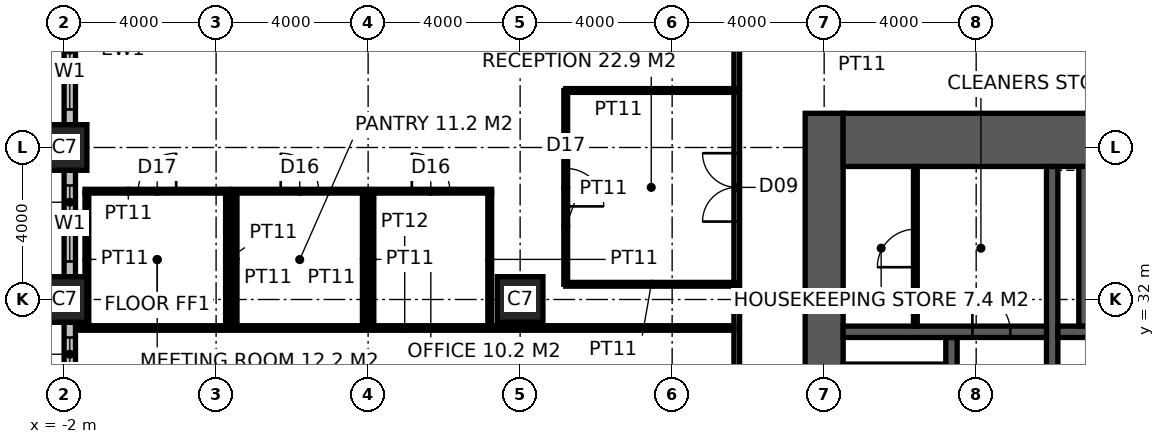
"""IFC4 building model, lengths in metres.
Left out: names, types, materials, properties, quantities, classifications, styles, units other than length and angle.
Written with IfcOpenShell. Run it as: python <this file> out.ifc"""

import sys

from ifc_helpers import new_model, si_unit, direction, frame, frame_2d, origin, origin_2d, place, context, subcontext, project, spatial, rectangle, hollow_rectangle, extrude, element, fill, save


model = new_model("IFC4")
c1 = context("Model", 3, precision=1e-05, world=origin(), true_north=direction((0.0, 1.0)))
c2 = subcontext(c1, "Body", "Model", "MODEL_VIEW")
j1 = project(units=[si_unit("LENGTHUNIT", "METRE"), si_unit("PLANEANGLEUNIT", "RADIAN")], contexts=[c1])
p1 = place(None, origin())
s1 = spatial("IfcSite", under=j1, at=p1, CompositionType="ELEMENT")
p2 = place(p1, origin())
s2 = spatial("IfcBuilding", under=s1, at=p2, CompositionType="ELEMENT")
p3 = place(p2, frame((0.0, 0.0, 63.0)))
s3 = spatial("IfcBuildingStorey", under=s2, at=p3, CompositionType="ELEMENT", Elevation=63.0)
for number, where, z_axis, x_axis in (
    (1, (-2.0, 32.0, 0.0), (0.0, 0.0, 1.0), (1.0, 0.0, 0.0)),
    (2, (-2.0, 36.0, 0.0), (0.0, 0.0, 1.0), (1.0, 0.0, 0.0)),
    (3, (10.0, 32.0, 0.0), (0.0, 0.0, 1.0), (1.0, 0.0, 0.0)),
):
    element("IfcColumn", number, at=place(p3, frame(where, z_axis=z_axis, x_axis=x_axis)), inside=s3, PredefinedType="COLUMN", context=c2, shape_type="SweptSolid", body=[
        extrude(hollow_rectangle(XDim=1.2, YDim=1.2, WallThickness=0.1, at=origin_2d()), origin(), (0.0, 0.0, 1.0), 4.0),
    ])
p4 = place(p3, frame((18.0, 17.1, -0.15), z_axis=(0.0, 0.0, 1.0), x_axis=(0.0, 1.0, 0.0)))
e4 = element("IfcWall", 4, at=p4, inside=s3, PredefinedType="SHEAR", context=c2, shape_type="SweptSolid", body=[
    extrude(rectangle(XDim=19.8, YDim=1.0, at=frame_2d((9.9, 0.0))), origin(), (0.0, 0.0, 1.0), 4.0),
])
p5 = place(p3, frame((18.5, 36.2, -0.15), z_axis=(0.0, 0.0, 1.0), x_axis=(1.0, 0.0, 0.0)))
e5 = element("IfcWall", 5, at=p5, inside=s3, PredefinedType="SHEAR", context=c2, shape_type="SweptSolid", body=[
    extrude(rectangle(XDim=23.7, YDim=1.4, at=frame_2d((11.85, 0.0))), origin(), (0.0, 0.0, 1.0), 4.0),
])
p6 = place(p3, frame((24.0, 18.5, -0.15), z_axis=(0.0, 0.0, 1.0), x_axis=(0.0, 1.0, 0.0)))
e6 = element("IfcWall", 6, at=p6, inside=s3, PredefinedType="SHEAR", context=c2, shape_type="SweptSolid", body=[
    extrude(rectangle(XDim=17.0, YDim=0.3, at=frame_2d((8.5, 0.0))), origin(), (0.0, 0.0, 1.0), 4.0),
])
p7 = place(p6, frame((9.6, 0.0, 0.15)))
e7 = element("IfcOpeningElement", 7, at=p7, cuts=e6, PredefinedType="OPENING", context=c2, shape_type="SweptSolid", body=[
    extrude(rectangle(XDim=1.5, YDim=2.4, at=frame_2d((0.75, 1.2))), frame((0.0, 0.16, 0.0), z_axis=(0.0, -1.0, 0.0), x_axis=(1.0, 0.0, 0.0)), (0.0, 0.0, 1.0), 0.32),
])
p8 = place(p3, frame((24.15, 31.15, -0.15), z_axis=(0.0, 0.0, 1.0), x_axis=(1.0, 0.0, 0.0)))
e8 = element("IfcWall", 8, at=p8, inside=s3, PredefinedType="SHEAR", context=c2, shape_type="SweptSolid", body=[
    extrude(rectangle(XDim=11.25, YDim=0.3, at=frame_2d((5.625, 0.0))), origin(), (0.0, 0.0, 1.0), 4.0),
])
p9 = place(p8, frame((7.25, 0.0, 0.15)))
e9 = element("IfcOpeningElement", 9, at=p9, cuts=e8, PredefinedType="OPENING", context=c2, shape_type="SweptSolid", body=[
    extrude(rectangle(XDim=1.4, YDim=2.4, at=frame_2d((0.7, 1.2))), frame((0.0, 0.16, 0.0), z_axis=(0.0, -1.0, 0.0), x_axis=(1.0, 0.0, 0.0)), (0.0, 0.0, 1.0), 0.32),
])
p10 = place(p3, frame((21.35, 18.5, -0.15), z_axis=(0.0, 0.0, 1.0), x_axis=(0.0, 1.0, 0.0)))
e10 = element("IfcWall", 10, at=p10, inside=s3, PredefinedType="SHEAR", context=c2, shape_type="SweptSolid", body=[
    extrude(rectangle(XDim=12.5, YDim=0.3, at=frame_2d((6.25, 0.0))), origin(), (0.0, 0.0, 1.0), 4.0),
])
p11 = place(p10, frame((8.15, 0.0, 0.15)))
e11 = element("IfcOpeningElement", 11, at=p11, cuts=e10, PredefinedType="OPENING", context=c2, shape_type="SweptSolid", body=[
    extrude(rectangle(XDim=1.0, YDim=2.2, at=frame_2d((0.5, 1.1))), frame((0.0, 0.16, 0.0), z_axis=(0.0, -1.0, 0.0), x_axis=(1.0, 0.0, 0.0)), (0.0, 0.0, 1.0), 0.32),
])
p12 = place(p3, frame((18.5, 31.15, -0.15), z_axis=(0.0, 0.0, 1.0), x_axis=(1.0, 0.0, 0.0)))
e12 = element("IfcWall", 12, at=p12, inside=s3, PredefinedType="SHEAR", context=c2, shape_type="SweptSolid", body=[
    extrude(rectangle(XDim=5.35, YDim=0.3, at=frame_2d((2.675, 0.0))), origin(), (0.0, 0.0, 1.0), 4.0),
])
p13 = place(p12, frame((3.4, 0.0, 0.15)))
e13 = element("IfcOpeningElement", 13, at=p13, cuts=e12, PredefinedType="OPENING", context=c2, shape_type="SweptSolid", body=[
    extrude(rectangle(XDim=1.0, YDim=2.2, at=frame_2d((0.5, 1.1))), frame((0.0, 0.16, 0.0), z_axis=(0.0, -1.0, 0.0), x_axis=(1.0, 0.0, 0.0)), (0.0, 0.0, 1.0), 0.32),
])
p14 = place(p3, frame((24.85, 31.3, -0.15), z_axis=(0.0, 0.0, 1.0), x_axis=(0.0, 1.0, 0.0)))
e14 = element("IfcWall", 14, at=p14, inside=s3, PredefinedType="SHEAR", context=c2, shape_type="SweptSolid", body=[
    extrude(rectangle(XDim=4.2, YDim=0.3, at=frame_2d((2.1, 0.0))), origin(), (0.0, 0.0, 1.0), 4.0),
])
p15 = place(p3, frame((20.4, 31.3, 0.0), z_axis=(0.0, 0.0, 1.0), x_axis=(0.0, 1.0, 0.0)))
e15 = element("IfcWall", 15, at=p15, inside=s3, PredefinedType="PARTITIONING", context=c2, shape_type="SweptSolid", body=[
    extrude(rectangle(XDim=4.2, YDim=0.1, at=frame_2d((2.1, 0.0))), origin(), (0.0, 0.0, 1.0), 3.85),
])
p16 = place(p15, frame((1.55, 0.0, 0.0)))
e16 = element("IfcOpeningElement", 16, at=p16, cuts=e15, PredefinedType="OPENING", context=c2, shape_type="SweptSolid", body=[
    extrude(rectangle(XDim=1.0, YDim=2.2, at=frame_2d((0.5, 1.1))), frame((0.0, 0.06, 0.0), z_axis=(0.0, -1.0, 0.0), x_axis=(1.0, 0.0, 0.0)), (0.0, 0.0, 1.0), 0.12),
])
p17 = place(p3, frame((15.7, 14.625, 0.0), z_axis=(0.0, 0.0, 1.0), x_axis=(0.0, 1.0, 0.0)))
e17 = element("IfcWall", 17, at=p17, inside=s3, PredefinedType="PARTITIONING", context=c2, shape_type="SweptSolid", body=[
    extrude(rectangle(XDim=24.15, YDim=0.15, at=frame_2d((12.075, 0.0))), origin(), (0.0, 0.0, 1.0), 3.85),
])
p18 = place(p17, frame((7.475, 0.0, 0.0)))
e18 = element("IfcOpeningElement", 18, at=p18, cuts=e17, PredefinedType="OPENING", context=c2, shape_type="SweptSolid", body=[
    extrude(rectangle(XDim=1.8, YDim=2.4, at=frame_2d((0.9, 1.2))), frame((0.0, 0.085, 0.0), z_axis=(0.0, -1.0, 0.0), x_axis=(1.0, 0.0, 0.0)), (0.0, 0.0, 1.0), 0.17),
])
p19 = place(p17, frame((19.425, 0.0, 0.0)))
e19 = element("IfcOpeningElement", 19, at=p19, cuts=e17, PredefinedType="OPENING", context=c2, shape_type="SweptSolid", body=[
    extrude(rectangle(XDim=1.8, YDim=2.4, at=frame_2d((0.9, 1.2))), frame((0.0, 0.085, 0.0), z_axis=(0.0, -1.0, 0.0), x_axis=(1.0, 0.0, 0.0)), (0.0, 0.0, 1.0), 0.17),
])
p20 = place(p3, frame((-1.7, 31.25, 0.0), z_axis=(0.0, 0.0, 1.0), x_axis=(1.0, 0.0, 0.0)))
e20 = element("IfcWall", 20, at=p20, inside=s3, PredefinedType="PARTITIONING", context=c2, shape_type="SweptSolid", body=[
    extrude(rectangle(XDim=17.325, YDim=0.12, at=frame_2d((8.663, 0.0))), origin(), (0.0, 0.0, 1.0), 3.85),
])
p21 = place(p3, frame((-1.45, 34.85, 0.0), z_axis=(0.0, 0.0, 1.0), x_axis=(1.0, 0.0, 0.0)))
e21 = element("IfcWall", 21, at=p21, inside=s3, PredefinedType="PARTITIONING", context=c2, shape_type="SweptSolid", body=[
    extrude(rectangle(XDim=3.8, YDim=0.1, at=frame_2d((1.9, 0.0))), origin(), (0.0, 0.0, 1.0), 3.85),
])
p22 = place(p21, frame((1.4, 0.0, 0.0)))
e22 = element("IfcOpeningElement", 22, at=p22, cuts=e21, PredefinedType="OPENING", context=c2, shape_type="SweptSolid", body=[
    extrude(rectangle(XDim=1.0, YDim=2.2, at=frame_2d((0.5, 1.1))), frame((0.0, 0.06, 0.0), z_axis=(0.0, -1.0, 0.0), x_axis=(1.0, 0.0, 0.0)), (0.0, 0.0, 1.0), 0.12),
])
p23 = place(p3, frame((2.45, 34.85, 0.0), z_axis=(0.0, 0.0, 1.0), x_axis=(1.0, 0.0, 0.0)))
e23 = element("IfcWall", 23, at=p23, inside=s3, PredefinedType="PARTITIONING", context=c2, shape_type="SweptSolid", body=[
    extrude(rectangle(XDim=3.5, YDim=0.1, at=frame_2d((1.75, 0.0))), origin(), (0.0, 0.0, 1.0), 3.85),
])
p24 = place(p23, frame((1.25, 0.0, 0.0)))
e24 = element("IfcOpeningElement", 24, at=p24, cuts=e23, PredefinedType="OPENING", context=c2, shape_type="SweptSolid", body=[
    extrude(rectangle(XDim=1.0, YDim=2.2, at=frame_2d((0.5, 1.1))), frame((0.0, 0.06, 0.0), z_axis=(0.0, -1.0, 0.0), x_axis=(1.0, 0.0, 0.0)), (0.0, 0.0, 1.0), 0.12),
])
p25 = place(p3, frame((6.05, 34.85, 0.0), z_axis=(0.0, 0.0, 1.0), x_axis=(1.0, 0.0, 0.0)))
e25 = element("IfcWall", 25, at=p25, inside=s3, PredefinedType="PARTITIONING", context=c2, shape_type="SweptSolid", body=[
    extrude(rectangle(XDim=3.2, YDim=0.1, at=frame_2d((1.6, 0.0))), origin(), (0.0, 0.0, 1.0), 3.85),
])
p26 = place(p25, frame((1.1, 0.0, 0.0)))
e26 = element("IfcOpeningElement", 26, at=p26, cuts=e25, PredefinedType="OPENING", context=c2, shape_type="SweptSolid", body=[
    extrude(rectangle(XDim=1.0, YDim=2.2, at=frame_2d((0.5, 1.1))), frame((0.0, 0.06, 0.0), z_axis=(0.0, -1.0, 0.0), x_axis=(1.0, 0.0, 0.0)), (0.0, 0.0, 1.0), 0.12),
])
for number, where, z_axis, x_axis in (
    (27, (-1.4, 31.31, 0.0), (0.0, 0.0, 1.0), (0.0, 1.0, 0.0)),
    (28, (2.3, 31.31, 0.0), (0.0, 0.0, 1.0), (0.0, 1.0, 0.0)),
    (29, (2.5, 31.31, 0.0), (0.0, 0.0, 1.0), (0.0, 1.0, 0.0)),
    (30, (5.9, 31.31, 0.0), (0.0, 0.0, 1.0), (0.0, 1.0, 0.0)),
    (31, (6.1, 31.31, 0.0), (0.0, 0.0, 1.0), (0.0, 1.0, 0.0)),
    (32, (9.2, 31.31, 0.0), (0.0, 0.0, 1.0), (0.0, 1.0, 0.0)),
):
    element("IfcWall", number, at=place(p3, frame(where, z_axis=z_axis, x_axis=x_axis)), inside=s3, PredefinedType="PARTITIONING", context=c2, shape_type="SweptSolid", body=[
        extrude(rectangle(XDim=3.49, YDim=0.1, at=frame_2d((1.745, 0.0))), origin(), (0.0, 0.0, 1.0), 3.85),
    ])
p27 = place(p3, frame((15.7, 37.5, 0.0), z_axis=(0.0, 0.0, 1.0), x_axis=(-1.0, 0.0, 0.0)))
e33 = element("IfcWall", 33, at=p27, inside=s3, PredefinedType="PARTITIONING", context=c2, shape_type="SweptSolid", body=[
    extrude(rectangle(XDim=4.5, YDim=0.1, at=frame_2d((2.25, 0.0))), origin(), (0.0, 0.0, 1.0), 3.85),
])
p28 = place(p3, frame((11.2, 37.5, 0.0), z_axis=(0.0, 0.0, 1.0), x_axis=(0.0, -1.0, 0.0)))
e34 = element("IfcWall", 34, at=p28, inside=s3, PredefinedType="PARTITIONING", context=c2, shape_type="SweptSolid", body=[
    extrude(rectangle(XDim=5.1, YDim=0.1, at=frame_2d((2.55, 0.0))), origin(), (0.0, 0.0, 1.0), 3.85),
])
p29 = place(p28, frame((2.05, 0.0, 0.0)))
e35 = element("IfcOpeningElement", 35, at=p29, cuts=e34, PredefinedType="OPENING", context=c2, shape_type="SweptSolid", body=[
    extrude(rectangle(XDim=1.0, YDim=2.2, at=frame_2d((0.5, 1.1))), frame((0.0, 0.06, 0.0), z_axis=(0.0, -1.0, 0.0), x_axis=(1.0, 0.0, 0.0)), (0.0, 0.0, 1.0), 0.12),
])
p30 = place(p3, frame((11.2, 32.4, 0.0), z_axis=(0.0, 0.0, 1.0), x_axis=(1.0, 0.0, 0.0)))
e36 = element("IfcWall", 36, at=p30, inside=s3, PredefinedType="PARTITIONING", context=c2, shape_type="SweptSolid", body=[
    extrude(rectangle(XDim=4.5, YDim=0.1, at=frame_2d((2.25, 0.0))), origin(), (0.0, 0.0, 1.0), 2.95),
])
p31 = place(p3, frame((-1.85, 31.4, 0.0), z_axis=(0.0, 0.0, 1.0), x_axis=(0.0, -1.0, 0.0)))
e37 = element("IfcWall", 37, at=p31, inside=s3, PredefinedType="ELEMENTEDWALL", context=c2, shape_type="SweptSolid", body=[
    extrude(rectangle(XDim=2.8, YDim=0.3, at=frame_2d((1.4, 0.0))), origin(), (0.0, 0.0, 1.0), 2.85),
])
p32 = place(p31, frame((0.4, 0.0, 0.8)))
e38 = element("IfcOpeningElement", 38, at=p32, cuts=e37, PredefinedType="OPENING", context=c2, shape_type="SweptSolid", body=[
    extrude(rectangle(XDim=2.0, YDim=2.0, at=frame_2d((1.0, 1.0))), frame((0.0, 0.16, 0.0), z_axis=(0.0, -1.0, 0.0), x_axis=(1.0, 0.0, 0.0)), (0.0, 0.0, 1.0), 0.32),
])
p33 = place(p3, frame((-1.85, 35.4, 0.0), z_axis=(0.0, 0.0, 1.0), x_axis=(0.0, -1.0, 0.0)))
e39 = element("IfcWall", 39, at=p33, inside=s3, PredefinedType="ELEMENTEDWALL", context=c2, shape_type="SweptSolid", body=[
    extrude(rectangle(XDim=2.8, YDim=0.3, at=frame_2d((1.4, 0.0))), origin(), (0.0, 0.0, 1.0), 2.85),
])
p34 = place(p33, frame((0.4, 0.0, 0.8)))
e40 = element("IfcOpeningElement", 40, at=p34, cuts=e39, PredefinedType="OPENING", context=c2, shape_type="SweptSolid", body=[
    extrude(rectangle(XDim=2.0, YDim=2.0, at=frame_2d((1.0, 1.0))), frame((0.0, 0.16, 0.0), z_axis=(0.0, -1.0, 0.0), x_axis=(1.0, 0.0, 0.0)), (0.0, 0.0, 1.0), 0.32),
])
p35 = place(p3, frame((-1.85, 39.4, 0.0), z_axis=(0.0, 0.0, 1.0), x_axis=(0.0, -1.0, 0.0)))
e41 = element("IfcWall", 41, at=p35, inside=s3, PredefinedType="ELEMENTEDWALL", context=c2, shape_type="SweptSolid", body=[
    extrude(rectangle(XDim=2.8, YDim=0.3, at=frame_2d((1.4, 0.0))), origin(), (0.0, 0.0, 1.0), 2.85),
])
p36 = place(p35, frame((0.4, 0.0, 0.8)))
e42 = element("IfcOpeningElement", 42, at=p36, cuts=e41, PredefinedType="OPENING", context=c2, shape_type="SweptSolid", body=[
    extrude(rectangle(XDim=2.0, YDim=2.0, at=frame_2d((1.0, 1.0))), frame((0.0, 0.16, 0.0), z_axis=(0.0, -1.0, 0.0), x_axis=(1.0, 0.0, 0.0)), (0.0, 0.0, 1.0), 0.32),
])
p37 = place(p13, origin())
e43 = element("IfcDoor", 43, at=p37, inside=s3, OperationType="SINGLE_SWING_LEFT", PredefinedType="DOOR", context=c2, shape_type="SweptSolid", body=[
    extrude(rectangle(XDim=1.0, YDim=2.2, at=frame_2d((0.5, 1.1))), frame((0.0, 0.025, 0.0), z_axis=(0.0, -1.0, 0.0), x_axis=(1.0, 0.0, 0.0)), (0.0, 0.0, 1.0), 0.05),
])
fill(e13, e43)
p38 = place(p16, origin())
e44 = element("IfcDoor", 44, at=p38, inside=s3, OperationType="SINGLE_SWING_LEFT", PredefinedType="DOOR", context=c2, shape_type="SweptSolid", body=[
    extrude(rectangle(XDim=1.0, YDim=2.2, at=frame_2d((0.5, 1.1))), frame((0.0, 0.025, 0.0), z_axis=(0.0, -1.0, 0.0), x_axis=(1.0, 0.0, 0.0)), (0.0, 0.0, 1.0), 0.05),
])
fill(e16, e44)
p39 = place(p19, origin())
e45 = element("IfcDoor", 45, at=p39, inside=s3, OperationType="DOUBLE_DOOR_DOUBLE_SWING", PredefinedType="DOOR", context=c2, shape_type="SweptSolid", body=[
    extrude(rectangle(XDim=1.8, YDim=2.4, at=frame_2d((0.9, 1.2))), frame((0.0, 0.025, 0.0), z_axis=(0.0, -1.0, 0.0), x_axis=(1.0, 0.0, 0.0)), (0.0, 0.0, 1.0), 0.05),
])
fill(e19, e45)
p40 = place(p22, origin())
e46 = element("IfcDoor", 46, at=p40, inside=s3, OperationType="SINGLE_SWING_RIGHT", PredefinedType="DOOR", context=c2, shape_type="SweptSolid", body=[
    extrude(rectangle(XDim=1.0, YDim=2.2, at=frame_2d((0.5, 1.1))), frame((0.0, 0.025, 0.0), z_axis=(0.0, -1.0, 0.0), x_axis=(1.0, 0.0, 0.0)), (0.0, 0.0, 1.0), 0.05),
])
fill(e22, e46)
p41 = place(p24, origin())
e47 = element("IfcDoor", 47, at=p41, inside=s3, OperationType="SINGLE_SWING_LEFT", PredefinedType="DOOR", context=c2, shape_type="SweptSolid", body=[
    extrude(rectangle(XDim=1.0, YDim=2.2, at=frame_2d((0.5, 1.1))), frame((0.0, 0.025, 0.0), z_axis=(0.0, -1.0, 0.0), x_axis=(1.0, 0.0, 0.0)), (0.0, 0.0, 1.0), 0.05),
])
fill(e24, e47)
p42 = place(p26, origin())
e48 = element("IfcDoor", 48, at=p42, inside=s3, OperationType="SINGLE_SWING_LEFT", PredefinedType="DOOR", context=c2, shape_type="SweptSolid", body=[
    extrude(rectangle(XDim=1.0, YDim=2.2, at=frame_2d((0.5, 1.1))), frame((0.0, 0.025, 0.0), z_axis=(0.0, -1.0, 0.0), x_axis=(1.0, 0.0, 0.0)), (0.0, 0.0, 1.0), 0.05),
])
fill(e26, e48)
p43 = place(p29, origin())
e49 = element("IfcDoor", 49, at=p43, inside=s3, OperationType="SINGLE_SWING_RIGHT", PredefinedType="DOOR", context=c2, shape_type="SweptSolid", body=[
    extrude(rectangle(XDim=1.0, YDim=2.2, at=frame_2d((0.5, 1.1))), frame((0.0, 0.025, 0.0), z_axis=(0.0, -1.0, 0.0), x_axis=(1.0, 0.0, 0.0)), (0.0, 0.0, 1.0), 0.05),
])
fill(e35, e49)
p44 = place(p32, origin())
e50 = element("IfcWindow", 50, at=p44, inside=s3, PartitioningType="SINGLE_PANEL", PredefinedType="WINDOW", context=c2, shape_type="SweptSolid", body=[
    extrude(rectangle(XDim=2.0, YDim=2.0, at=frame_2d((1.0, 1.0))), frame((0.0, 0.03, 0.0), z_axis=(0.0, -1.0, 0.0), x_axis=(1.0, 0.0, 0.0)), (0.0, 0.0, 1.0), 0.06),
])
fill(e38, e50)
p45 = place(p34, origin())
e51 = element("IfcWindow", 51, at=p45, inside=s3, PartitioningType="SINGLE_PANEL", PredefinedType="WINDOW", context=c2, shape_type="SweptSolid", body=[
    extrude(rectangle(XDim=2.0, YDim=2.0, at=frame_2d((1.0, 1.0))), frame((0.0, 0.03, 0.0), z_axis=(0.0, -1.0, 0.0), x_axis=(1.0, 0.0, 0.0)), (0.0, 0.0, 1.0), 0.06),
])
fill(e40, e51)
p46 = place(p36, origin())
e52 = element("IfcWindow", 52, at=p46, inside=s3, PartitioningType="SINGLE_PANEL", PredefinedType="WINDOW", context=c2, shape_type="SweptSolid", body=[
    extrude(rectangle(XDim=2.0, YDim=2.0, at=frame_2d((1.0, 1.0))), frame((0.0, 0.03, 0.0), z_axis=(0.0, -1.0, 0.0), x_axis=(1.0, 0.0, 0.0)), (0.0, 0.0, 1.0), 0.06),
])
fill(e42, e52)
save(model, sys.argv[1])
